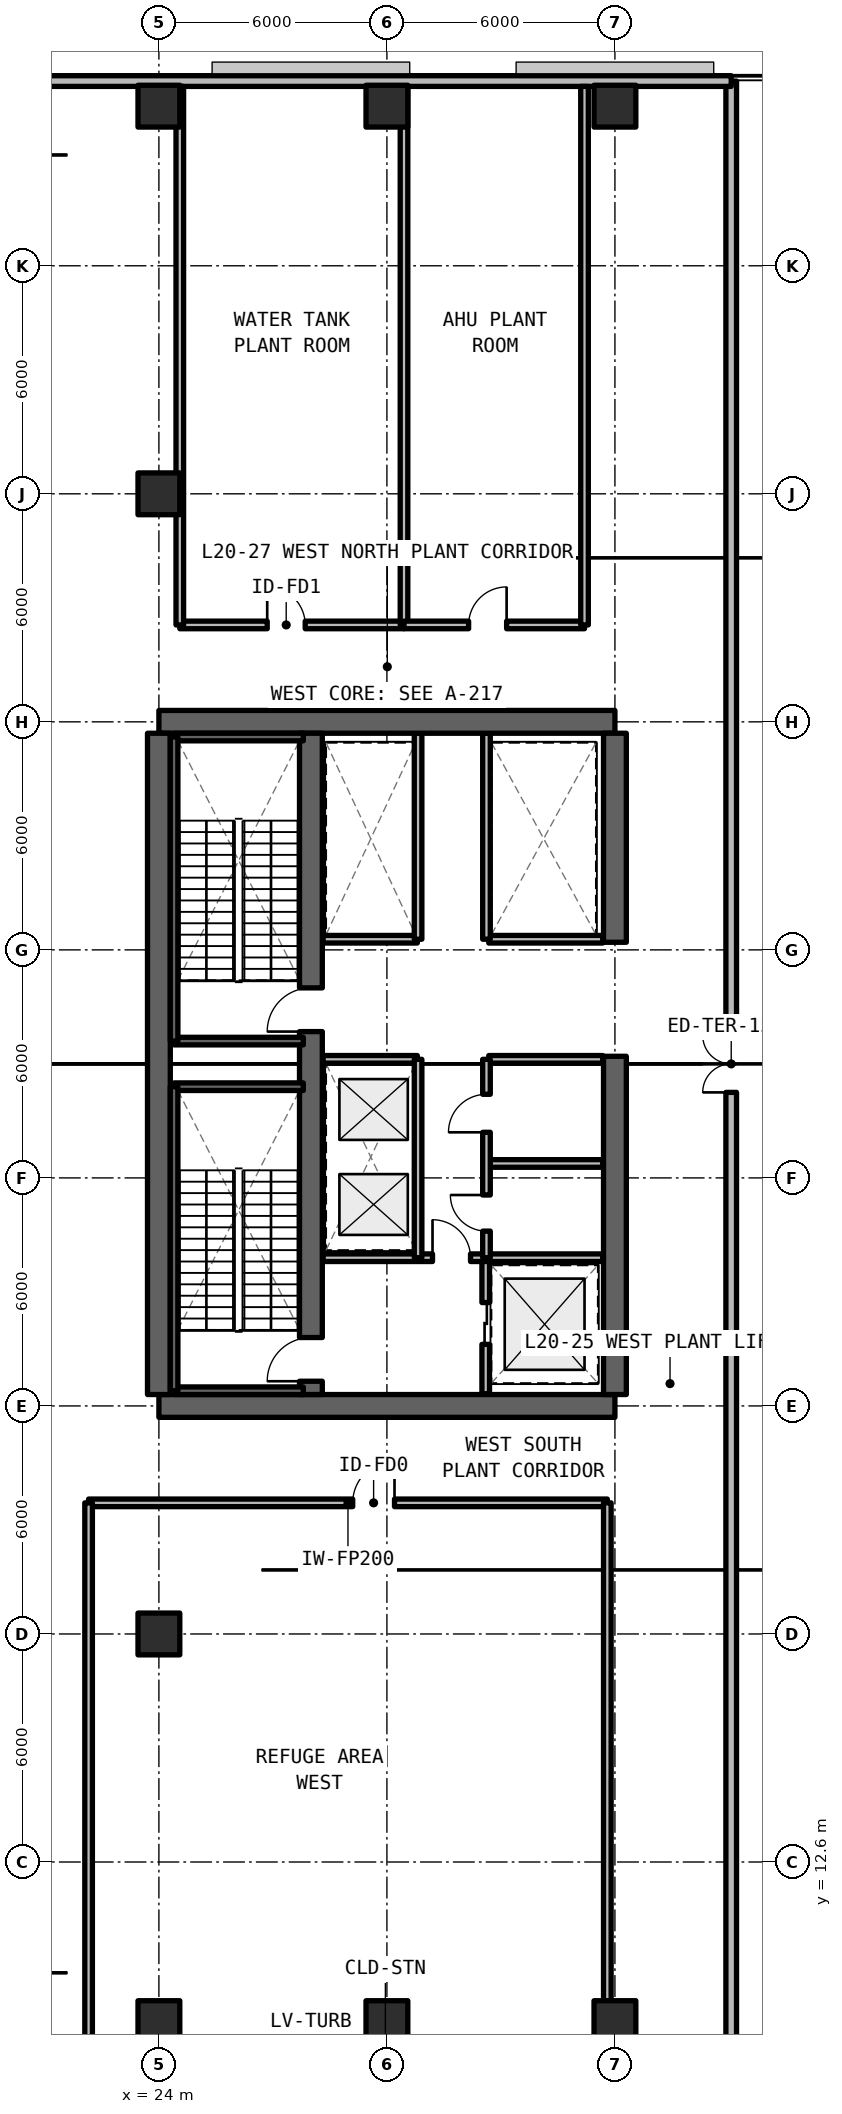
"""IFC4 building model, lengths in metres.
Left out: names, types, materials, properties, quantities, classifications, styles, units other than length and angle.
Written with IfcOpenShell. Run it as: python <this file> out.ifc"""

import sys

from ifc_helpers import new_model, si_unit, direction, frame, frame_2d, origin, origin_2d, place, context, subcontext, project, spatial, rectangle, extrude, element, fill, save


model = new_model("IFC4")
c1 = context("Model", 3, precision=1e-05, world=origin(), true_north=direction((0.0, 1.0)))
c2 = subcontext(c1, "Body", "Model", "MODEL_VIEW")
j1 = project(units=[si_unit("LENGTHUNIT", "METRE"), si_unit("PLANEANGLEUNIT", "RADIAN")], contexts=[c1])
p1 = place(None, origin())
s1 = spatial("IfcSite", under=j1, at=p1, CompositionType="ELEMENT")
p2 = place(p1, origin())
s2 = spatial("IfcBuilding", under=s1, at=p2, CompositionType="ELEMENT")
p3 = place(p2, frame((0.0, 0.0, 73.26)))
s3 = spatial("IfcBuildingStorey", under=s2, at=p3, CompositionType="ELEMENT", Elevation=73.26)
for number, where, z_axis, x_axis in (
    (1, (24.0, 24.6, 0.0), (0.0, 0.0, 1.0), (1.0, 0.0, 0.0)),
    (2, (36.0, 42.6, 0.0), (0.0, 0.0, 1.0), (-1.0, 0.0, 0.0)),
):
    element("IfcWall", number, at=place(p3, frame(where, z_axis=z_axis, x_axis=x_axis)), inside=s3, PredefinedType="SHEAR", context=c2, shape_type="SweptSolid", body=[
        extrude(rectangle(XDim=12.0, YDim=0.6, at=frame_2d((6.0, 0.0))), origin(), (0.0, 0.0, 1.0), 4.95),
    ])
p4 = place(p3, frame((24.0, 24.9, 0.0), z_axis=(0.0, 0.0, 1.0), x_axis=(0.0, 1.0, 0.0)))
e3 = element("IfcWall", 3, at=p4, inside=s3, PredefinedType="SHEAR", context=c2, shape_type="SweptSolid", body=[
    extrude(rectangle(XDim=17.4, YDim=0.6, at=frame_2d((8.7, 0.0))), origin(), (0.0, 0.0, 1.0), 4.95),
])
p5 = place(p3, frame((36.0, 24.9, 0.0), z_axis=(0.0, 0.0, 1.0), x_axis=(0.0, 1.0, 0.0)))
e4 = element("IfcWall", 4, at=p5, inside=s3, PredefinedType="SHEAR", context=c2, shape_type="SweptSolid", body=[
    extrude(rectangle(XDim=8.9, YDim=0.6, at=frame_2d((4.45, 0.0))), origin(), (0.0, 0.0, 1.0), 4.95),
])
p6 = place(p3, frame((36.0, 36.8, 0.0), z_axis=(0.0, 0.0, 1.0), x_axis=(0.0, 1.0, 0.0)))
e5 = element("IfcWall", 5, at=p6, inside=s3, PredefinedType="SHEAR", context=c2, shape_type="SweptSolid", body=[
    extrude(rectangle(XDim=5.5, YDim=0.6, at=frame_2d((2.75, 0.0))), origin(), (0.0, 0.0, 1.0), 4.95),
])
p7 = place(p3, frame((28.0, 24.9, 0.0), z_axis=(0.0, 0.0, 1.0), x_axis=(0.0, 1.0, 0.0)))
e6 = element("IfcWall", 6, at=p7, inside=s3, PredefinedType="SHEAR", context=c2, shape_type="SweptSolid", body=[
    extrude(rectangle(XDim=17.4, YDim=0.6, at=frame_2d((8.7, 0.0))), origin(), (0.0, 0.0, 1.0), 4.95),
])
p8 = place(p7, frame((0.35, 0.0, 0.0)))
e7 = element("IfcOpeningElement", 7, at=p8, cuts=e6, PredefinedType="OPENING", context=c2, shape_type="SweptSolid", body=[
    extrude(rectangle(XDim=1.15, YDim=2.15, at=frame_2d((0.575, 1.075))), frame((0.0, 0.31, 0.0), z_axis=(0.0, -1.0, 0.0), x_axis=(1.0, 0.0, 0.0)), (0.0, 0.0, 1.0), 0.62),
])
p9 = place(p7, frame((9.55, 0.0, 0.0)))
e8 = element("IfcOpeningElement", 8, at=p9, cuts=e6, PredefinedType="OPENING", context=c2, shape_type="SweptSolid", body=[
    extrude(rectangle(XDim=1.15, YDim=2.15, at=frame_2d((0.575, 1.075))), frame((0.0, 0.31, 0.0), z_axis=(0.0, -1.0, 0.0), x_axis=(1.0, 0.0, 0.0)), (0.0, 0.0, 1.0), 0.62),
])
for number, where, z_axis, x_axis in (
    (9, (24.0, 18.6, 0.0), (0.0, 0.0, 1.0), (1.0, 0.0, 0.0)),
    (10, (24.0, 48.6, 0.0), (0.0, 0.0, 1.0), (1.0, 0.0, 0.0)),
):
    element("IfcColumn", number, at=place(p3, frame(where, z_axis=z_axis, x_axis=x_axis)), inside=s3, PredefinedType="COLUMN", context=c2, shape_type="SweptSolid", body=[
        extrude(rectangle(XDim=1.1, YDim=1.1, at=origin_2d()), origin(), (0.0, 0.0, 1.0), 4.95),
    ])
for number, where, z_axis, x_axis in (
    (11, (24.0, 8.4, 0.0), (0.0, 0.0, 1.0), (1.0, 0.0, 0.0)),
    (12, (24.0, 58.8, 0.0), (0.0, 0.0, 1.0), (1.0, 0.0, 0.0)),
    (13, (30.0, 8.4, 0.0), (0.0, 0.0, 1.0), (1.0, 0.0, 0.0)),
    (14, (30.0, 58.8, 0.0), (0.0, 0.0, 1.0), (1.0, 0.0, 0.0)),
    (15, (36.0, 8.4, 0.0), (0.0, 0.0, 1.0), (1.0, 0.0, 0.0)),
    (16, (36.0, 58.8, 0.0), (0.0, 0.0, 1.0), (1.0, 0.0, 0.0)),
):
    element("IfcColumn", number, at=place(p3, frame(where, z_axis=z_axis, x_axis=x_axis)), inside=s3, PredefinedType="COLUMN", context=c2, shape_type="SweptSolid", body=[
        extrude(rectangle(XDim=1.1, YDim=1.1, at=origin_2d()), origin(), (0.0, 0.0, 1.0), 4.67),
    ])
p10 = place(p3, frame((39.06, 7.74, 0.0), z_axis=(0.0, 0.0, 1.0), x_axis=(0.0, 1.0, 0.0)))
e17 = element("IfcWall", 17, at=p10, inside=s3, PredefinedType="SOLIDWALL", context=c2, shape_type="SweptSolid", body=[
    extrude(rectangle(XDim=51.72, YDim=0.28, at=frame_2d((25.86, 0.0))), origin(), (0.0, 0.0, 1.0), 4.246),
])
p11 = place(p10, frame((25.11, 0.0, 0.0)))
e18 = element("IfcOpeningElement", 18, at=p11, cuts=e17, PredefinedType="OPENING", context=c2, shape_type="SweptSolid", body=[
    extrude(rectangle(XDim=1.5, YDim=2.2, at=frame_2d((0.75, 1.1))), frame((0.0, 0.15, 0.0), z_axis=(0.0, -1.0, 0.0), x_axis=(1.0, 0.0, 0.0)), (0.0, 0.0, 1.0), 0.3),
])
p12 = place(p3, frame((39.06, 59.46, 0.0), z_axis=(0.0, 0.0, 1.0), x_axis=(-1.0, 0.0, 0.0)))
e19 = element("IfcWall", 19, at=p12, inside=s3, PredefinedType="SOLIDWALL", context=c2, shape_type="SweptSolid", body=[
    extrude(rectangle(XDim=18.202, YDim=0.28, at=frame_2d((9.101, 0.0))), origin(), (0.0, 0.0, 1.0), 4.67),
])
p13 = place(p3, frame((32.6, 24.92, 0.0), z_axis=(0.0, 0.0, 1.0), x_axis=(0.0, 1.0, 0.0)))
e20 = element("IfcWall", 20, at=p13, inside=s3, PredefinedType="SOLIDWALL", context=c2, shape_type="SweptSolid", body=[
    extrude(rectangle(XDim=3.58, YDim=0.2, at=frame_2d((1.79, 0.0))), origin(), (0.0, 0.0, 1.0), 3.89),
])
p14 = place(p13, frame((1.3, 0.0, 0.0)))
e21 = element("IfcOpeningElement", 21, at=p14, cuts=e20, PredefinedType="OPENING", context=c2, shape_type="SweptSolid", body=[
    extrude(rectangle(XDim=1.1, YDim=2.2, at=frame_2d((0.55, 1.1))), frame((0.0, 0.11, 0.0), z_axis=(0.0, -1.0, 0.0), x_axis=(1.0, 0.0, 0.0)), (0.0, 0.0, 1.0), 0.22),
])
p15 = place(p3, frame((28.32, 28.5, 0.0), z_axis=(0.0, 0.0, 1.0), x_axis=(1.0, 0.0, 0.0)))
e22 = element("IfcWall", 22, at=p15, inside=s3, PredefinedType="SOLIDWALL", context=c2, shape_type="SweptSolid", body=[
    extrude(rectangle(XDim=7.36, YDim=0.2, at=frame_2d((3.68, 0.0))), origin(), (0.0, 0.0, 1.0), 3.89),
])
p16 = place(p15, frame((2.88, 0.0, 0.0)))
e23 = element("IfcOpeningElement", 23, at=p16, cuts=e22, PredefinedType="OPENING", context=c2, shape_type="SweptSolid", body=[
    extrude(rectangle(XDim=1.0, YDim=2.15, at=frame_2d((0.5, 1.075))), frame((0.0, 0.11, 0.0), z_axis=(0.0, -1.0, 0.0), x_axis=(1.0, 0.0, 0.0)), (0.0, 0.0, 1.0), 0.22),
])
p17 = place(p3, frame((28.32, 33.72, 0.0), z_axis=(0.0, 0.0, 1.0), x_axis=(1.0, 0.0, 0.0)))
e24 = element("IfcWall", 24, at=p17, inside=s3, PredefinedType="SOLIDWALL", context=c2, shape_type="SweptSolid", body=[
    extrude(rectangle(XDim=2.48, YDim=0.2, at=frame_2d((1.24, 0.0))), origin(), (0.0, 0.0, 1.0), 3.89),
])
p18 = place(p3, frame((30.82, 28.5, 0.0), z_axis=(0.0, 0.0, 1.0), x_axis=(0.0, 1.0, 0.0)))
e25 = element("IfcWall", 25, at=p18, inside=s3, PredefinedType="SOLIDWALL", context=c2, shape_type="SweptSolid", body=[
    extrude(rectangle(XDim=5.22, YDim=0.2, at=frame_2d((2.61, 0.0))), origin(), (0.0, 0.0, 1.0), 3.89),
])
for number, where, z_axis, x_axis in (
    (26, (32.68, 30.98, 0.0), (0.0, 0.0, 1.0), (1.0, 0.0, 0.0)),
    (27, (32.68, 33.72, 0.0), (0.0, 0.0, 1.0), (1.0, 0.0, 0.0)),
):
    element("IfcWall", number, at=place(p3, frame(where, z_axis=z_axis, x_axis=x_axis)), inside=s3, PredefinedType="SOLIDWALL", context=c2, shape_type="SweptSolid", body=[
        extrude(rectangle(XDim=3.0, YDim=0.2, at=frame_2d((1.5, 0.0))), origin(), (0.0, 0.0, 1.0), 3.89),
    ])
p19 = place(p3, frame((32.62, 28.5, 0.0), z_axis=(0.0, 0.0, 1.0), x_axis=(0.0, 1.0, 0.0)))
e28 = element("IfcWall", 28, at=p19, inside=s3, PredefinedType="SOLIDWALL", context=c2, shape_type="SweptSolid", body=[
    extrude(rectangle(XDim=5.22, YDim=0.2, at=frame_2d((2.61, 0.0))), origin(), (0.0, 0.0, 1.0), 3.89),
])
p20 = place(p19, frame((0.7, 0.0, 0.0)))
e29 = element("IfcOpeningElement", 29, at=p20, cuts=e28, PredefinedType="OPENING", context=c2, shape_type="SweptSolid", body=[
    extrude(rectangle(XDim=0.95, YDim=2.15, at=frame_2d((0.475, 1.075))), frame((0.0, 0.11, 0.0), z_axis=(0.0, -1.0, 0.0), x_axis=(1.0, 0.0, 0.0)), (0.0, 0.0, 1.0), 0.22),
])
p21 = place(p19, frame((3.3, 0.0, 0.0)))
e30 = element("IfcOpeningElement", 30, at=p21, cuts=e28, PredefinedType="OPENING", context=c2, shape_type="SweptSolid", body=[
    extrude(rectangle(XDim=1.0, YDim=2.15, at=frame_2d((0.5, 1.075))), frame((0.0, 0.11, 0.0), z_axis=(0.0, -1.0, 0.0), x_axis=(1.0, 0.0, 0.0)), (0.0, 0.0, 1.0), 0.22),
])
p22 = place(p3, frame((28.32, 36.88, 0.0), z_axis=(0.0, 0.0, 1.0), x_axis=(1.0, 0.0, 0.0)))
e31 = element("IfcWall", 31, at=p22, inside=s3, PredefinedType="SOLIDWALL", context=c2, shape_type="SweptSolid", body=[
    extrude(rectangle(XDim=2.48, YDim=0.2, at=frame_2d((1.24, 0.0))), origin(), (0.0, 0.0, 1.0), 3.89),
])
p23 = place(p3, frame((30.82, 36.88, 0.0), z_axis=(0.0, 0.0, 1.0), x_axis=(0.0, 1.0, 0.0)))
e32 = element("IfcWall", 32, at=p23, inside=s3, PredefinedType="SOLIDWALL", context=c2, shape_type="SweptSolid", body=[
    extrude(rectangle(XDim=5.42, YDim=0.2, at=frame_2d((2.71, 0.0))), origin(), (0.0, 0.0, 1.0), 3.89),
])
p24 = place(p3, frame((32.68, 36.88, 0.0), z_axis=(0.0, 0.0, 1.0), x_axis=(1.0, 0.0, 0.0)))
e33 = element("IfcWall", 33, at=p24, inside=s3, PredefinedType="SOLIDWALL", context=c2, shape_type="SweptSolid", body=[
    extrude(rectangle(XDim=3.0, YDim=0.2, at=frame_2d((1.5, 0.0))), origin(), (0.0, 0.0, 1.0), 3.89),
])
p25 = place(p3, frame((32.62, 36.88, 0.0), z_axis=(0.0, 0.0, 1.0), x_axis=(0.0, 1.0, 0.0)))
e34 = element("IfcWall", 34, at=p25, inside=s3, PredefinedType="SOLIDWALL", context=c2, shape_type="SweptSolid", body=[
    extrude(rectangle(XDim=5.42, YDim=0.2, at=frame_2d((2.71, 0.0))), origin(), (0.0, 0.0, 1.0), 3.89),
])
p26 = place(p3, frame((22.15, 22.05, 0.0), z_axis=(0.0, 0.0, 1.0), x_axis=(1.0, 0.0, 0.0)))
e35 = element("IfcWall", 35, at=p26, inside=s3, PredefinedType="SOLIDWALL", context=c2, shape_type="SweptSolid", body=[
    extrude(rectangle(XDim=13.65, YDim=0.2, at=frame_2d((6.825, 0.0))), origin(), (0.0, 0.0, 1.0), 3.89),
])
p27 = place(p26, frame((6.95, 0.0, 0.0)))
e36 = element("IfcOpeningElement", 36, at=p27, cuts=e35, PredefinedType="OPENING", context=c2, shape_type="SweptSolid", body=[
    extrude(rectangle(XDim=1.1, YDim=2.15, at=frame_2d((0.55, 1.075))), frame((0.0, 0.11, 0.0), z_axis=(0.0, -1.0, 0.0), x_axis=(1.0, 0.0, 0.0)), (0.0, 0.0, 1.0), 0.22),
])
p28 = place(p3, frame((22.15, 7.88, 0.0), z_axis=(0.0, 0.0, 1.0), x_axis=(0.0, 1.0, 0.0)))
e37 = element("IfcWall", 37, at=p28, inside=s3, PredefinedType="SOLIDWALL", context=c2, shape_type="SweptSolid", body=[
    extrude(rectangle(XDim=14.17, YDim=0.2, at=frame_2d((7.085, 0.0))), origin(), (0.0, 0.0, 1.0), 3.89),
])
p29 = place(p3, frame((35.8, 7.88, 0.0), z_axis=(0.0, 0.0, 1.0), x_axis=(0.0, 1.0, 0.0)))
e38 = element("IfcWall", 38, at=p29, inside=s3, PredefinedType="SOLIDWALL", context=c2, shape_type="SweptSolid", body=[
    extrude(rectangle(XDim=14.17, YDim=0.2, at=frame_2d((7.085, 0.0))), origin(), (0.0, 0.0, 1.0), 3.647),
])
p30 = place(p3, frame((24.55, 45.15, 0.0), z_axis=(0.0, 0.0, 1.0), x_axis=(1.0, 0.0, 0.0)))
e39 = element("IfcWall", 39, at=p30, inside=s3, PredefinedType="SOLIDWALL", context=c2, shape_type="SweptSolid", body=[
    extrude(rectangle(XDim=5.9, YDim=0.2, at=frame_2d((2.95, 0.0))), origin(), (0.0, 0.0, 1.0), 3.89),
])
p31 = place(p30, frame((2.3, 0.0, 0.0)))
e40 = element("IfcOpeningElement", 40, at=p31, cuts=e39, PredefinedType="OPENING", context=c2, shape_type="SweptSolid", body=[
    extrude(rectangle(XDim=1.0, YDim=2.15, at=frame_2d((0.5, 1.075))), frame((0.0, 0.11, 0.0), z_axis=(0.0, -1.0, 0.0), x_axis=(1.0, 0.0, 0.0)), (0.0, 0.0, 1.0), 0.22),
])
for number, where, z_axis, x_axis in (
    (41, (24.55, 45.15, 0.0), (0.0, 0.0, 1.0), (0.0, 1.0, 0.0)),
    (42, (30.45, 45.15, 0.0), (0.0, 0.0, 1.0), (0.0, 1.0, 0.0)),
):
    element("IfcWall", number, at=place(p3, frame(where, z_axis=z_axis, x_axis=x_axis)), inside=s3, PredefinedType="SOLIDWALL", context=c2, shape_type="SweptSolid", body=[
        extrude(rectangle(XDim=14.17, YDim=0.2, at=frame_2d((7.085, 0.0))), origin(), (0.0, 0.0, 1.0), 3.89),
    ])
p32 = place(p3, frame((30.45, 45.15, 0.0), z_axis=(0.0, 0.0, 1.0), x_axis=(1.0, 0.0, 0.0)))
e43 = element("IfcWall", 43, at=p32, inside=s3, PredefinedType="SOLIDWALL", context=c2, shape_type="SweptSolid", body=[
    extrude(rectangle(XDim=4.75, YDim=0.2, at=frame_2d((2.375, 0.0))), origin(), (0.0, 0.0, 1.0), 3.89),
])
p33 = place(p32, frame((1.7, 0.0, 0.0)))
e44 = element("IfcOpeningElement", 44, at=p33, cuts=e43, PredefinedType="OPENING", context=c2, shape_type="SweptSolid", body=[
    extrude(rectangle(XDim=1.0, YDim=2.15, at=frame_2d((0.5, 1.075))), frame((0.0, 0.11, 0.0), z_axis=(0.0, -1.0, 0.0), x_axis=(1.0, 0.0, 0.0)), (0.0, 0.0, 1.0), 0.22),
])
p34 = place(p3, frame((35.2, 45.15, 0.0), z_axis=(0.0, 0.0, 1.0), x_axis=(0.0, 1.0, 0.0)))
e45 = element("IfcWall", 45, at=p34, inside=s3, PredefinedType="SOLIDWALL", context=c2, shape_type="SweptSolid", body=[
    extrude(rectangle(XDim=14.17, YDim=0.2, at=frame_2d((7.085, 0.0))), origin(), (0.0, 0.0, 1.0), 3.89),
])
for number, where, z_axis, x_axis in (
    (46, (24.4, 25.0, 0.0), (0.0, 0.0, 1.0), (1.0, 0.0, 0.0)),
    (47, (27.8, 33.0, 0.0), (0.0, 0.0, 1.0), (-1.0, 0.0, 0.0)),
):
    element("IfcWall", number, at=place(p3, frame(where, z_axis=z_axis, x_axis=x_axis)), inside=s3, PredefinedType="SOLIDWALL", context=c2, shape_type="SweptSolid", body=[
        extrude(rectangle(XDim=3.4, YDim=0.2, at=frame_2d((1.7, 0.0))), origin(), (0.0, 0.0, 1.0), 4.95),
    ])
p35 = place(p3, frame((24.4, 33.0, 0.0), z_axis=(0.0, 0.0, 1.0), x_axis=(0.0, -1.0, 0.0)))
e48 = element("IfcWall", 48, at=p35, inside=s3, PredefinedType="SOLIDWALL", context=c2, shape_type="SweptSolid", body=[
    extrude(rectangle(XDim=8.0, YDim=0.2, at=frame_2d((4.0, 0.0))), origin(), (0.0, 0.0, 1.0), 4.95),
])
for number, where, z_axis, x_axis in (
    (49, (24.4, 34.2, 0.0), (0.0, 0.0, 1.0), (1.0, 0.0, 0.0)),
    (50, (27.8, 42.2, 0.0), (0.0, 0.0, 1.0), (-1.0, 0.0, 0.0)),
):
    element("IfcWall", number, at=place(p3, frame(where, z_axis=z_axis, x_axis=x_axis)), inside=s3, PredefinedType="SOLIDWALL", context=c2, shape_type="SweptSolid", body=[
        extrude(rectangle(XDim=3.4, YDim=0.2, at=frame_2d((1.7, 0.0))), origin(), (0.0, 0.0, 1.0), 4.95),
    ])
p36 = place(p3, frame((24.4, 42.2, 0.0), z_axis=(0.0, 0.0, 1.0), x_axis=(0.0, -1.0, 0.0)))
e51 = element("IfcWall", 51, at=p36, inside=s3, PredefinedType="SOLIDWALL", context=c2, shape_type="SweptSolid", body=[
    extrude(rectangle(XDim=8.0, YDim=0.2, at=frame_2d((4.0, 0.0))), origin(), (0.0, 0.0, 1.0), 4.95),
])
p37 = place(p11, origin())
e52 = element("IfcDoor", 52, at=p37, inside=s3, OperationType="SINGLE_SWING_RIGHT", PredefinedType="DOOR", context=c2, shape_type="SweptSolid", body=[
    extrude(rectangle(XDim=1.5, YDim=2.2, at=frame_2d((0.75, 1.1))), frame((0.0, 0.025, 0.0), z_axis=(0.0, -1.0, 0.0), x_axis=(1.0, 0.0, 0.0)), (0.0, 0.0, 1.0), 0.05),
])
fill(e18, e52)
p38 = place(p14, origin())
e53 = element("IfcDoor", 53, at=p38, inside=s3, OperationType="SLIDING_TO_LEFT", PredefinedType="DOOR", context=c2, shape_type="SweptSolid", body=[
    extrude(rectangle(XDim=1.1, YDim=2.2, at=frame_2d((0.55, 1.1))), frame((0.0, 0.025, 0.0), z_axis=(0.0, -1.0, 0.0), x_axis=(1.0, 0.0, 0.0)), (0.0, 0.0, 1.0), 0.05),
])
fill(e21, e53)
p39 = place(p16, origin())
e54 = element("IfcDoor", 54, at=p39, inside=s3, OperationType="SINGLE_SWING_LEFT", PredefinedType="DOOR", context=c2, shape_type="SweptSolid", body=[
    extrude(rectangle(XDim=1.0, YDim=2.15, at=frame_2d((0.5, 1.075))), frame((0.0, 0.025, 0.0), z_axis=(0.0, -1.0, 0.0), x_axis=(1.0, 0.0, 0.0)), (0.0, 0.0, 1.0), 0.05),
])
fill(e23, e54)
p40 = place(p20, origin())
e55 = element("IfcDoor", 55, at=p40, inside=s3, OperationType="SINGLE_SWING_RIGHT", PredefinedType="DOOR", context=c2, shape_type="SweptSolid", body=[
    extrude(rectangle(XDim=0.95, YDim=2.15, at=frame_2d((0.475, 1.075))), frame((0.0, 0.025, 0.0), z_axis=(0.0, -1.0, 0.0), x_axis=(1.0, 0.0, 0.0)), (0.0, 0.0, 1.0), 0.05),
])
fill(e29, e55)
p41 = place(p21, origin())
e56 = element("IfcDoor", 56, at=p41, inside=s3, OperationType="SINGLE_SWING_LEFT", PredefinedType="DOOR", context=c2, shape_type="SweptSolid", body=[
    extrude(rectangle(XDim=1.0, YDim=2.15, at=frame_2d((0.5, 1.075))), frame((0.0, 0.025, 0.0), z_axis=(0.0, -1.0, 0.0), x_axis=(1.0, 0.0, 0.0)), (0.0, 0.0, 1.0), 0.05),
])
fill(e30, e56)
p42 = place(p27, origin())
e57 = element("IfcDoor", 57, at=p42, inside=s3, OperationType="SINGLE_SWING_RIGHT", PredefinedType="DOOR", context=c2, shape_type="SweptSolid", body=[
    extrude(rectangle(XDim=1.1, YDim=2.15, at=frame_2d((0.55, 1.075))), frame((0.0, 0.025, 0.0), z_axis=(0.0, -1.0, 0.0), x_axis=(1.0, 0.0, 0.0)), (0.0, 0.0, 1.0), 0.05),
])
fill(e36, e57)
p43 = place(p31, origin())
e58 = element("IfcDoor", 58, at=p43, inside=s3, OperationType="SINGLE_SWING_LEFT", PredefinedType="DOOR", context=c2, shape_type="SweptSolid", body=[
    extrude(rectangle(XDim=1.0, YDim=2.15, at=frame_2d((0.5, 1.075))), frame((0.0, 0.025, 0.0), z_axis=(0.0, -1.0, 0.0), x_axis=(1.0, 0.0, 0.0)), (0.0, 0.0, 1.0), 0.05),
])
fill(e40, e58)
p44 = place(p33, origin())
e59 = element("IfcDoor", 59, at=p44, inside=s3, OperationType="SINGLE_SWING_RIGHT", PredefinedType="DOOR", context=c2, shape_type="SweptSolid", body=[
    extrude(rectangle(XDim=1.0, YDim=2.15, at=frame_2d((0.5, 1.075))), frame((0.0, 0.025, 0.0), z_axis=(0.0, -1.0, 0.0), x_axis=(1.0, 0.0, 0.0)), (0.0, 0.0, 1.0), 0.05),
])
fill(e44, e59)
p45 = place(p8, origin())
e60 = element("IfcDoor", 60, at=p45, inside=s3, OperationType="SINGLE_SWING_LEFT", PredefinedType="DOOR", context=c2, shape_type="SweptSolid", body=[
    extrude(rectangle(XDim=1.15, YDim=2.15, at=frame_2d((0.575, 1.075))), frame((0.0, 0.025, 0.0), z_axis=(0.0, -1.0, 0.0), x_axis=(1.0, 0.0, 0.0)), (0.0, 0.0, 1.0), 0.05),
])
fill(e7, e60)
p46 = place(p9, origin())
e61 = element("IfcDoor", 61, at=p46, inside=s3, OperationType="SINGLE_SWING_RIGHT", PredefinedType="DOOR", context=c2, shape_type="SweptSolid", body=[
    extrude(rectangle(XDim=1.15, YDim=2.15, at=frame_2d((0.575, 1.075))), frame((0.0, 0.025, 0.0), z_axis=(0.0, -1.0, 0.0), x_axis=(1.0, 0.0, 0.0)), (0.0, 0.0, 1.0), 0.05),
])
fill(e8, e61)
save(model, sys.argv[1])
